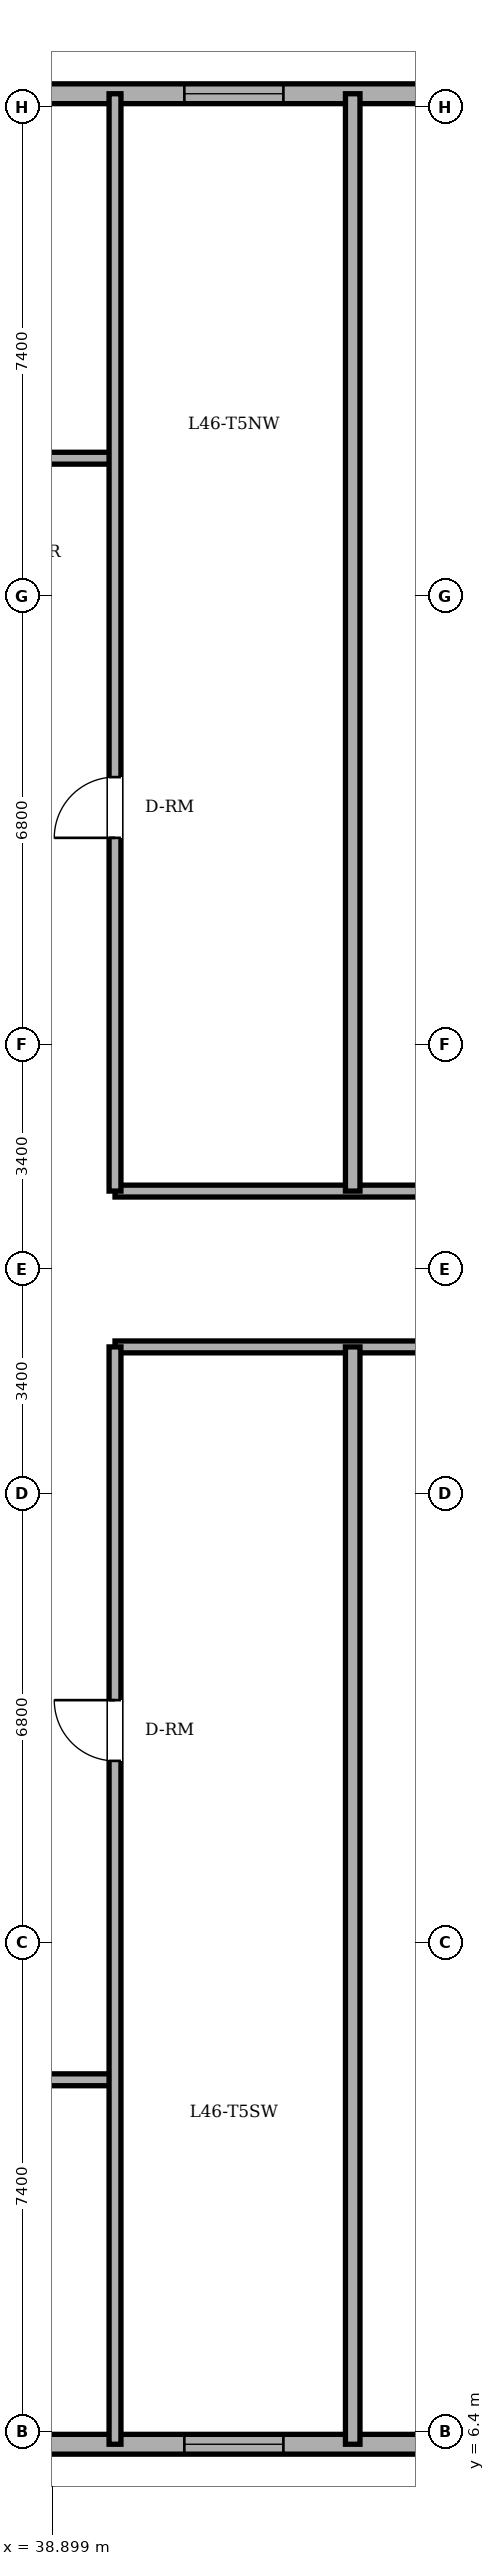
"""IFC4 building model, lengths in metres.
Left out: names, types, materials, properties, quantities, classifications, styles, units other than length and angle.
Written with IfcOpenShell. Run it as: python <this file> out.ifc"""

import sys

from ifc_helpers import new_model, si_unit, direction, frame, frame_2d, origin, place, context, subcontext, project, spatial, rectangle, extrude, element, fill, save


model = new_model("IFC4")
c1 = context("Model", 3, precision=1e-05, world=origin(), true_north=direction((0.0, 1.0)))
c2 = subcontext(c1, "Body", "Model", "MODEL_VIEW")
j1 = project(units=[si_unit("LENGTHUNIT", "METRE"), si_unit("PLANEANGLEUNIT", "RADIAN")], contexts=[c1])
p1 = place(None, origin())
s1 = spatial("IfcSite", under=j1, at=p1, CompositionType="ELEMENT")
p2 = place(p1, origin())
s2 = spatial("IfcBuilding", under=s1, at=p2, CompositionType="ELEMENT")
p3 = place(p2, frame((0.0, 0.0, 176.2)))
s3 = spatial("IfcBuildingStorey", under=s2, at=p3, CompositionType="ELEMENT", Elevation=176.2)
p4 = place(p3, frame((19.3, 6.2, 0.0), z_axis=(0.0, 0.0, 1.0), x_axis=(1.0, 0.0, 0.0)))
e1 = element("IfcWall", 1, at=p4, inside=s3, PredefinedType="SOLIDWALL", context=c2, shape_type="SweptSolid", body=[
    extrude(rectangle(XDim=30.282, YDim=0.3, at=frame_2d((15.141, 0.0))), origin(), (0.0, 0.0, 1.0), 3.4),
])
p5 = place(p4, frame((7.725, 0.0, 0.0)))
e2 = element("IfcOpeningElement", 2, at=p5, cuts=e1, PredefinedType="OPENING", context=c2, shape_type="SweptSolid", body=[
    extrude(rectangle(XDim=0.95, YDim=2.2, at=frame_2d((0.475, 1.1))), frame((0.0, 0.16, 0.0), z_axis=(0.0, -1.0, 0.0), x_axis=(1.0, 0.0, 0.0)), (0.0, 0.0, 1.0), 0.32),
])
p6 = place(p4, frame((1.25, 0.0, 0.85)))
e3 = element("IfcOpeningElement", 3, at=p6, cuts=e1, PredefinedType="OPENING", context=c2, shape_type="SweptSolid", body=[
    extrude(rectangle(XDim=1.5, YDim=1.55, at=frame_2d((0.75, 0.775))), frame((0.0, 0.16, 0.0), z_axis=(0.0, -1.0, 0.0), x_axis=(1.0, 0.0, 0.0)), (0.0, 0.0, 1.0), 0.32),
])
p7 = place(p4, frame((2.9, 0.0, 0.85)))
e4 = element("IfcOpeningElement", 4, at=p7, cuts=e1, PredefinedType="OPENING", context=c2, shape_type="SweptSolid", body=[
    extrude(rectangle(XDim=1.5, YDim=1.55, at=frame_2d((0.75, 0.775))), frame((0.0, 0.16, 0.0), z_axis=(0.0, -1.0, 0.0), x_axis=(1.0, 0.0, 0.0)), (0.0, 0.0, 1.0), 0.32),
])
p8 = place(p4, frame((12.167, 0.0, 0.85)))
e5 = element("IfcOpeningElement", 5, at=p8, cuts=e1, PredefinedType="OPENING", context=c2, shape_type="SweptSolid", body=[
    extrude(rectangle(XDim=1.5, YDim=1.55, at=frame_2d((0.75, 0.775))), frame((0.0, 0.16, 0.0), z_axis=(0.0, -1.0, 0.0), x_axis=(1.0, 0.0, 0.0)), (0.0, 0.0, 1.0), 0.32),
])
p9 = place(p4, frame((15.983, 0.0, 0.85)))
e6 = element("IfcOpeningElement", 6, at=p9, cuts=e1, PredefinedType="OPENING", context=c2, shape_type="SweptSolid", body=[
    extrude(rectangle(XDim=1.5, YDim=1.55, at=frame_2d((0.75, 0.775))), frame((0.0, 0.16, 0.0), z_axis=(0.0, -1.0, 0.0), x_axis=(1.0, 0.0, 0.0)), (0.0, 0.0, 1.0), 0.32),
])
p10 = place(p4, frame((21.6, 0.0, 0.85)))
e7 = element("IfcOpeningElement", 7, at=p10, cuts=e1, PredefinedType="OPENING", context=c2, shape_type="SweptSolid", body=[
    extrude(rectangle(XDim=1.5, YDim=1.55, at=frame_2d((0.75, 0.775))), frame((0.0, 0.16, 0.0), z_axis=(0.0, -1.0, 0.0), x_axis=(1.0, 0.0, 0.0)), (0.0, 0.0, 1.0), 0.32),
])
p11 = place(p4, frame((25.327, 0.0, 0.85)))
e8 = element("IfcOpeningElement", 8, at=p11, cuts=e1, PredefinedType="OPENING", context=c2, shape_type="SweptSolid", body=[
    extrude(rectangle(XDim=1.5, YDim=1.55, at=frame_2d((0.75, 0.775))), frame((0.0, 0.16, 0.0), z_axis=(0.0, -1.0, 0.0), x_axis=(1.0, 0.0, 0.0)), (0.0, 0.0, 1.0), 0.32),
])
p12 = place(p4, frame((27.255, 0.0, 0.85)))
e9 = element("IfcOpeningElement", 9, at=p12, cuts=e1, PredefinedType="OPENING", context=c2, shape_type="SweptSolid", body=[
    extrude(rectangle(XDim=1.5, YDim=1.55, at=frame_2d((0.75, 0.775))), frame((0.0, 0.16, 0.0), z_axis=(0.0, -1.0, 0.0), x_axis=(1.0, 0.0, 0.0)), (0.0, 0.0, 1.0), 0.32),
])
p13 = place(p3, frame((49.582, 41.8, 0.0), z_axis=(0.0, 0.0, 1.0), x_axis=(-1.0, 0.0, 0.0)))
e10 = element("IfcWall", 10, at=p13, inside=s3, PredefinedType="SOLIDWALL", context=c2, shape_type="SweptSolid", body=[
    extrude(rectangle(XDim=30.282, YDim=0.3, at=frame_2d((15.141, 0.0))), origin(), (0.0, 0.0, 1.0), 3.4),
])
p14 = place(p13, frame((25.407, 0.0, 0.0)))
e11 = element("IfcOpeningElement", 11, at=p14, cuts=e10, PredefinedType="OPENING", context=c2, shape_type="SweptSolid", body=[
    extrude(rectangle(XDim=0.95, YDim=2.2, at=frame_2d((0.475, 1.1))), frame((0.0, 0.16, 0.0), z_axis=(0.0, -1.0, 0.0), x_axis=(1.0, 0.0, 0.0)), (0.0, 0.0, 1.0), 0.32),
])
p15 = place(p13, frame((1.527, 0.0, 0.85)))
e12 = element("IfcOpeningElement", 12, at=p15, cuts=e10, PredefinedType="OPENING", context=c2, shape_type="SweptSolid", body=[
    extrude(rectangle(XDim=1.5, YDim=1.55, at=frame_2d((0.75, 0.775))), frame((0.0, 0.16, 0.0), z_axis=(0.0, -1.0, 0.0), x_axis=(1.0, 0.0, 0.0)), (0.0, 0.0, 1.0), 0.32),
])
p16 = place(p13, frame((3.455, 0.0, 0.85)))
e13 = element("IfcOpeningElement", 13, at=p16, cuts=e10, PredefinedType="OPENING", context=c2, shape_type="SweptSolid", body=[
    extrude(rectangle(XDim=1.5, YDim=1.55, at=frame_2d((0.75, 0.775))), frame((0.0, 0.16, 0.0), z_axis=(0.0, -1.0, 0.0), x_axis=(1.0, 0.0, 0.0)), (0.0, 0.0, 1.0), 0.32),
])
p17 = place(p13, frame((7.182, 0.0, 0.85)))
e14 = element("IfcOpeningElement", 14, at=p17, cuts=e10, PredefinedType="OPENING", context=c2, shape_type="SweptSolid", body=[
    extrude(rectangle(XDim=1.5, YDim=1.55, at=frame_2d((0.75, 0.775))), frame((0.0, 0.16, 0.0), z_axis=(0.0, -1.0, 0.0), x_axis=(1.0, 0.0, 0.0)), (0.0, 0.0, 1.0), 0.32),
])
p18 = place(p13, frame((11.665, 0.0, 0.85)))
e15 = element("IfcOpeningElement", 15, at=p18, cuts=e10, PredefinedType="OPENING", context=c2, shape_type="SweptSolid", body=[
    extrude(rectangle(XDim=1.5, YDim=1.55, at=frame_2d((0.75, 0.775))), frame((0.0, 0.16, 0.0), z_axis=(0.0, -1.0, 0.0), x_axis=(1.0, 0.0, 0.0)), (0.0, 0.0, 1.0), 0.32),
])
p19 = place(p13, frame((14.349, 0.0, 0.85)))
e16 = element("IfcOpeningElement", 16, at=p19, cuts=e10, PredefinedType="OPENING", context=c2, shape_type="SweptSolid", body=[
    extrude(rectangle(XDim=1.5, YDim=1.55, at=frame_2d((0.75, 0.775))), frame((0.0, 0.16, 0.0), z_axis=(0.0, -1.0, 0.0), x_axis=(1.0, 0.0, 0.0)), (0.0, 0.0, 1.0), 0.32),
])
p20 = place(p13, frame((18.932, 0.0, 0.85)))
e17 = element("IfcOpeningElement", 17, at=p20, cuts=e10, PredefinedType="OPENING", context=c2, shape_type="SweptSolid", body=[
    extrude(rectangle(XDim=1.5, YDim=1.55, at=frame_2d((0.75, 0.775))), frame((0.0, 0.16, 0.0), z_axis=(0.0, -1.0, 0.0), x_axis=(1.0, 0.0, 0.0)), (0.0, 0.0, 1.0), 0.32),
])
p21 = place(p13, frame((22.532, 0.0, 0.85)))
e18 = element("IfcOpeningElement", 18, at=p21, cuts=e10, PredefinedType="OPENING", context=c2, shape_type="SweptSolid", body=[
    extrude(rectangle(XDim=1.5, YDim=1.55, at=frame_2d((0.75, 0.775))), frame((0.0, 0.16, 0.0), z_axis=(0.0, -1.0, 0.0), x_axis=(1.0, 0.0, 0.0)), (0.0, 0.0, 1.0), 0.32),
])
p22 = place(p13, frame((27.532, 0.0, 0.85)))
e19 = element("IfcOpeningElement", 19, at=p22, cuts=e10, PredefinedType="OPENING", context=c2, shape_type="SweptSolid", body=[
    extrude(rectangle(XDim=1.5, YDim=1.55, at=frame_2d((0.75, 0.775))), frame((0.0, 0.16, 0.0), z_axis=(0.0, -1.0, 0.0), x_axis=(1.0, 0.0, 0.0)), (0.0, 0.0, 1.0), 0.32),
])
p23 = place(p3, frame((13.8, 11.72, 0.0), z_axis=(0.0, 0.0, 1.0), x_axis=(1.0, 0.0, 0.0)))
e20 = element("IfcWall", 20, at=p23, inside=s3, PredefinedType="PARTITIONING", context=c2, shape_type="SweptSolid", body=[
    extrude(rectangle(XDim=26.05, YDim=0.18, at=frame_2d((13.025, 0.0))), origin(), (0.0, 0.0, 1.0), 3.4),
])
p24 = place(p23, frame((12.24, 0.0, 0.0)))
e21 = element("IfcOpeningElement", 21, at=p24, cuts=e20, PredefinedType="OPENING", context=c2, shape_type="SweptSolid", body=[
    extrude(rectangle(XDim=0.92, YDim=2.1, at=frame_2d((0.46, 1.05))), frame((0.0, 0.1, 0.0), z_axis=(0.0, -1.0, 0.0), x_axis=(1.0, 0.0, 0.0)), (0.0, 0.0, 1.0), 0.2),
])
p25 = place(p23, frame((5.54, 0.0, 0.0)))
e22 = element("IfcOpeningElement", 22, at=p25, cuts=e20, PredefinedType="OPENING", context=c2, shape_type="SweptSolid", body=[
    extrude(rectangle(XDim=0.92, YDim=2.1, at=frame_2d((0.46, 1.05))), frame((0.0, 0.1, 0.0), z_axis=(0.0, -1.0, 0.0), x_axis=(1.0, 0.0, 0.0)), (0.0, 0.0, 1.0), 0.2),
])
p26 = place(p23, frame((19.605, 0.0, 0.0)))
e23 = element("IfcOpeningElement", 23, at=p26, cuts=e20, PredefinedType="OPENING", context=c2, shape_type="SweptSolid", body=[
    extrude(rectangle(XDim=0.92, YDim=2.1, at=frame_2d((0.46, 1.05))), frame((0.0, 0.1, 0.0), z_axis=(0.0, -1.0, 0.0), x_axis=(1.0, 0.0, 0.0)), (0.0, 0.0, 1.0), 0.2),
])
p27 = place(p3, frame((39.85, 22.82, 0.0), z_axis=(0.0, 0.0, 1.0), x_axis=(1.0, 0.0, 0.0)))
e24 = element("IfcWall", 24, at=p27, inside=s3, PredefinedType="PARTITIONING", context=c2, shape_type="SweptSolid", body=[
    extrude(rectangle(XDim=23.15, YDim=0.18, at=frame_2d((11.575, 0.0))), origin(), (0.0, 0.0, 1.0), 3.4),
])
p28 = place(p27, frame((4.94, 0.0, 0.0)))
e25 = element("IfcOpeningElement", 25, at=p28, cuts=e24, PredefinedType="OPENING", context=c2, shape_type="SweptSolid", body=[
    extrude(rectangle(XDim=0.92, YDim=2.1, at=frame_2d((0.46, 1.05))), frame((0.0, 0.1, 0.0), z_axis=(0.0, -1.0, 0.0), x_axis=(1.0, 0.0, 0.0)), (0.0, 0.0, 1.0), 0.2),
])
p29 = place(p3, frame((39.85, 25.18, 0.0), z_axis=(0.0, 0.0, 1.0), x_axis=(1.0, 0.0, 0.0)))
e26 = element("IfcWall", 26, at=p29, inside=s3, PredefinedType="PARTITIONING", context=c2, shape_type="SweptSolid", body=[
    extrude(rectangle(XDim=23.15, YDim=0.18, at=frame_2d((11.575, 0.0))), origin(), (0.0, 0.0, 1.0), 3.4),
])
p30 = place(p29, frame((4.94, 0.0, 0.0)))
e27 = element("IfcOpeningElement", 27, at=p30, cuts=e26, PredefinedType="OPENING", context=c2, shape_type="SweptSolid", body=[
    extrude(rectangle(XDim=0.92, YDim=2.1, at=frame_2d((0.46, 1.05))), frame((0.0, 0.1, 0.0), z_axis=(0.0, -1.0, 0.0), x_axis=(1.0, 0.0, 0.0)), (0.0, 0.0, 1.0), 0.2),
])
p31 = place(p3, frame((13.8, 36.28, 0.0), z_axis=(0.0, 0.0, 1.0), x_axis=(1.0, 0.0, 0.0)))
e28 = element("IfcWall", 28, at=p31, inside=s3, PredefinedType="PARTITIONING", context=c2, shape_type="SweptSolid", body=[
    extrude(rectangle(XDim=26.05, YDim=0.18, at=frame_2d((13.025, 0.0))), origin(), (0.0, 0.0, 1.0), 3.4),
])
p32 = place(p31, frame((12.05, 0.0, 0.0)))
e29 = element("IfcOpeningElement", 29, at=p32, cuts=e28, PredefinedType="OPENING", context=c2, shape_type="SweptSolid", body=[
    extrude(rectangle(XDim=0.9, YDim=2.1, at=frame_2d((0.45, 1.05))), frame((0.0, 0.1, 0.0), z_axis=(0.0, -1.0, 0.0), x_axis=(1.0, 0.0, 0.0)), (0.0, 0.0, 1.0), 0.2),
])
p33 = place(p31, frame((15.67, 0.0, 0.0)))
e30 = element("IfcOpeningElement", 30, at=p33, cuts=e28, PredefinedType="OPENING", context=c2, shape_type="SweptSolid", body=[
    extrude(rectangle(XDim=0.86, YDim=2.1, at=frame_2d((0.43, 1.05))), frame((0.0, 0.1, 0.0), z_axis=(0.0, -1.0, 0.0), x_axis=(1.0, 0.0, 0.0)), (0.0, 0.0, 1.0), 0.2),
])
p34 = place(p31, frame((5.54, 0.0, 0.0)))
e31 = element("IfcOpeningElement", 31, at=p34, cuts=e28, PredefinedType="OPENING", context=c2, shape_type="SweptSolid", body=[
    extrude(rectangle(XDim=0.92, YDim=2.1, at=frame_2d((0.46, 1.05))), frame((0.0, 0.1, 0.0), z_axis=(0.0, -1.0, 0.0), x_axis=(1.0, 0.0, 0.0)), (0.0, 0.0, 1.0), 0.2),
])
p35 = place(p31, frame((21.305, 0.0, 0.0)))
e32 = element("IfcOpeningElement", 32, at=p35, cuts=e28, PredefinedType="OPENING", context=c2, shape_type="SweptSolid", body=[
    extrude(rectangle(XDim=0.92, YDim=2.1, at=frame_2d((0.46, 1.05))), frame((0.0, 0.1, 0.0), z_axis=(0.0, -1.0, 0.0), x_axis=(1.0, 0.0, 0.0)), (0.0, 0.0, 1.0), 0.2),
])
p36 = place(p3, frame((39.85, 6.2, 0.0), z_axis=(0.0, 0.0, 1.0), x_axis=(0.0, 1.0, 0.0)))
e33 = element("IfcWall", 33, at=p36, inside=s3, PredefinedType="PARTITIONING", context=c2, shape_type="SweptSolid", body=[
    extrude(rectangle(XDim=16.62, YDim=0.18, at=frame_2d((8.31, 0.0))), origin(), (0.0, 0.0, 1.0), 3.4),
])
p37 = place(p36, frame((10.35, 0.0, 0.0)))
e34 = element("IfcOpeningElement", 34, at=p37, cuts=e33, PredefinedType="OPENING", context=c2, shape_type="SweptSolid", body=[
    extrude(rectangle(XDim=0.92, YDim=2.1, at=frame_2d((0.46, 1.05))), frame((0.0, 0.1, 0.0), z_axis=(0.0, -1.0, 0.0), x_axis=(1.0, 0.0, 0.0)), (0.0, 0.0, 1.0), 0.2),
])
p38 = place(p3, frame((39.85, 25.18, 0.0), z_axis=(0.0, 0.0, 1.0), x_axis=(0.0, 1.0, 0.0)))
e35 = element("IfcWall", 35, at=p38, inside=s3, PredefinedType="PARTITIONING", context=c2, shape_type="SweptSolid", body=[
    extrude(rectangle(XDim=16.62, YDim=0.18, at=frame_2d((8.31, 0.0))), origin(), (0.0, 0.0, 1.0), 3.4),
])
p39 = place(p38, frame((5.35, 0.0, 0.0)))
e36 = element("IfcOpeningElement", 36, at=p39, cuts=e35, PredefinedType="OPENING", context=c2, shape_type="SweptSolid", body=[
    extrude(rectangle(XDim=0.92, YDim=2.1, at=frame_2d((0.46, 1.05))), frame((0.0, 0.1, 0.0), z_axis=(0.0, -1.0, 0.0), x_axis=(1.0, 0.0, 0.0)), (0.0, 0.0, 1.0), 0.2),
])
for number, where, z_axis, x_axis in (
    (37, (43.45, 6.2, 0.0), (0.0, 0.0, 1.0), (0.0, 1.0, 0.0)),
    (38, (43.45, 25.18, 0.0), (0.0, 0.0, 1.0), (0.0, 1.0, 0.0)),
):
    element("IfcWall", number, at=place(p3, frame(where, z_axis=z_axis, x_axis=x_axis)), inside=s3, PredefinedType="PARTITIONING", context=c2, shape_type="SweptSolid", body=[
        extrude(rectangle(XDim=16.62, YDim=0.22, at=frame_2d((8.31, 0.0))), origin(), (0.0, 0.0, 1.0), 3.4),
    ])
p40 = place(p10, origin())
e39 = element("IfcWindow", 39, at=p40, inside=s3, PartitioningType="DOUBLE_PANEL_VERTICAL", PredefinedType="WINDOW", context=c2, shape_type="SweptSolid", body=[
    extrude(rectangle(XDim=1.5, YDim=1.55, at=frame_2d((0.75, 0.775))), frame((0.0, 0.03, 0.0), z_axis=(0.0, -1.0, 0.0), x_axis=(1.0, 0.0, 0.0)), (0.0, 0.0, 1.0), 0.06),
])
fill(e7, e39)
p41 = place(p17, origin())
e40 = element("IfcWindow", 40, at=p41, inside=s3, PartitioningType="DOUBLE_PANEL_VERTICAL", PredefinedType="WINDOW", context=c2, shape_type="SweptSolid", body=[
    extrude(rectangle(XDim=1.5, YDim=1.55, at=frame_2d((0.75, 0.775))), frame((0.0, 0.03, 0.0), z_axis=(0.0, -1.0, 0.0), x_axis=(1.0, 0.0, 0.0)), (0.0, 0.0, 1.0), 0.06),
])
fill(e14, e40)
p42 = place(p39, origin())
e41 = element("IfcDoor", 41, at=p42, inside=s3, OperationType="SINGLE_SWING_LEFT", PredefinedType="DOOR", context=c2, shape_type="SweptSolid", body=[
    extrude(rectangle(XDim=0.92, YDim=2.1, at=frame_2d((0.46, 1.05))), frame((0.0, 0.025, 0.0), z_axis=(0.0, -1.0, 0.0), x_axis=(1.0, 0.0, 0.0)), (0.0, 0.0, 1.0), 0.05),
])
fill(e36, e41)
p43 = place(p37, origin())
e42 = element("IfcDoor", 42, at=p43, inside=s3, OperationType="SINGLE_SWING_RIGHT", PredefinedType="DOOR", context=c2, shape_type="SweptSolid", body=[
    extrude(rectangle(XDim=0.92, YDim=2.1, at=frame_2d((0.46, 1.05))), frame((0.0, 0.025, 0.0), z_axis=(0.0, -1.0, 0.0), x_axis=(1.0, 0.0, 0.0)), (0.0, 0.0, 1.0), 0.05),
])
fill(e34, e42)
save(model, sys.argv[1])
